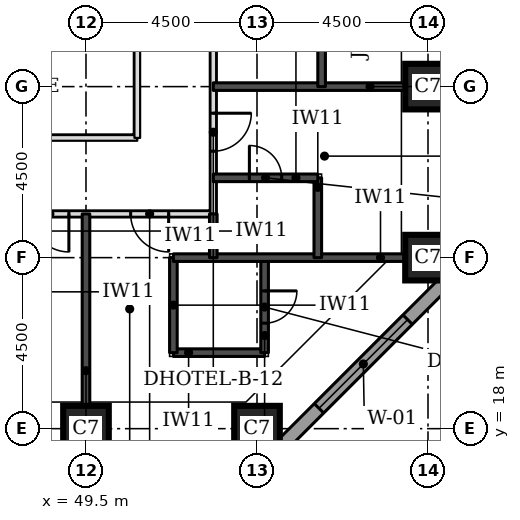
"""IFC4 building model, lengths in metres.
Left out: names, types, materials, properties, quantities, classifications, styles, units other than length and angle.
Written with IfcOpenShell. Run it as: python <this file> out.ifc"""

import sys

from ifc_helpers import new_model, si_unit, direction, frame, frame_2d, origin, origin_2d, place, context, subcontext, project, spatial, rectangle, extrude, element, fill, save


model = new_model("IFC4")
c1 = context("Model", 3, precision=1e-05, world=origin(), true_north=direction((0.0, 1.0)))
c2 = subcontext(c1, "Body", "Model", "MODEL_VIEW")
j1 = project(units=[si_unit("LENGTHUNIT", "METRE"), si_unit("PLANEANGLEUNIT", "RADIAN")], contexts=[c1])
p1 = place(None, origin())
s1 = spatial("IfcSite", under=j1, at=p1, CompositionType="ELEMENT")
p2 = place(p1, origin())
s2 = spatial("IfcBuilding", under=s1, at=p2, CompositionType="ELEMENT")
p3 = place(p2, frame((0.0, 0.0, 29.7)))
s3 = spatial("IfcBuildingStorey", under=s2, at=p3, CompositionType="ELEMENT", Elevation=29.7)
for number, where, z_axis, x_axis in (
    (1, (49.5, 18.0, 0.0), (0.0, 0.0, 1.0), (1.0, 0.0, 0.0)),
    (2, (54.0, 18.0, 0.0), (0.0, 0.0, 1.0), (1.0, 0.0, 0.0)),
    (3, (58.5, 22.5, 0.0), (0.0, 0.0, 1.0), (1.0, 0.0, 0.0)),
    (4, (58.5, 27.0, 0.0), (0.0, 0.0, 1.0), (1.0, 0.0, 0.0)),
):
    element("IfcColumn", number, at=place(p3, frame(where, z_axis=z_axis, x_axis=x_axis)), inside=s3, PredefinedType="COLUMN", context=c2, shape_type="SweptSolid", body=[
        extrude(rectangle(XDim=1.2, YDim=1.2, at=origin_2d()), origin(), (0.0, 0.0, 1.0), 3.3),
    ])
p4 = place(p3, frame((54.27, 17.174, 0.0), z_axis=(0.0, 0.0, 1.0), x_axis=(0.707106781187, 0.707106781187, 0.0)))
e5 = element("IfcWall", 5, at=p4, inside=s3, PredefinedType="STANDARD", context=c2, shape_type="SweptSolid", body=[
    extrude(rectangle(XDim=7.151, YDim=0.35, at=frame_2d((3.576, 0.0))), origin(), (0.0, 0.0, 1.0), 3.055),
])
p5 = place(p4, frame((1.926, 0.0, 0.8)))
e6 = element("IfcOpeningElement", 6, at=p5, cuts=e5, PredefinedType="OPENING", context=c2, shape_type="SweptSolid", body=[
    extrude(rectangle(XDim=3.3, YDim=1.5, at=frame_2d((1.65, 0.75))), frame((0.0, 0.185, 0.0), z_axis=(0.0, -1.0, 0.0), x_axis=(1.0, 0.0, 0.0)), (0.0, 0.0, 1.0), 0.37),
])
p6 = place(p3, frame((20.65, 23.65, 0.0), z_axis=(0.0, 0.0, 1.0), x_axis=(1.0, 0.0, 0.0)))
e7 = element("IfcWall", 7, at=p6, inside=s3, PredefinedType="PARTITIONING", context=c2, shape_type="SweptSolid", body=[
    extrude(rectangle(XDim=32.2, YDim=0.15, at=frame_2d((16.1, 0.0))), origin(), (0.0, 0.0, 1.0), 3.08),
])
p7 = place(p6, frame((2.55, 0.0, 0.0)))
e8 = element("IfcOpeningElement", 8, at=p7, cuts=e7, PredefinedType="OPENING", context=c2, shape_type="SweptSolid", body=[
    extrude(rectangle(XDim=1.0, YDim=2.1, at=frame_2d((0.5, 1.05))), frame((0.0, 0.085, 0.0), z_axis=(0.0, -1.0, 0.0), x_axis=(1.0, 0.0, 0.0)), (0.0, 0.0, 1.0), 0.17),
])
p8 = place(p6, frame((9.4, 0.0, 0.0)))
e9 = element("IfcOpeningElement", 9, at=p8, cuts=e7, PredefinedType="OPENING", context=c2, shape_type="SweptSolid", body=[
    extrude(rectangle(XDim=1.0, YDim=2.1, at=frame_2d((0.5, 1.05))), frame((0.0, 0.085, 0.0), z_axis=(0.0, -1.0, 0.0), x_axis=(1.0, 0.0, 0.0)), (0.0, 0.0, 1.0), 0.17),
])
p9 = place(p6, frame((11.55, 0.0, 0.0)))
e10 = element("IfcOpeningElement", 10, at=p9, cuts=e7, PredefinedType="OPENING", context=c2, shape_type="SweptSolid", body=[
    extrude(rectangle(XDim=1.0, YDim=2.1, at=frame_2d((0.5, 1.05))), frame((0.0, 0.085, 0.0), z_axis=(0.0, -1.0, 0.0), x_axis=(1.0, 0.0, 0.0)), (0.0, 0.0, 1.0), 0.17),
])
p10 = place(p6, frame((18.4, 0.0, 0.0)))
e11 = element("IfcOpeningElement", 11, at=p10, cuts=e7, PredefinedType="OPENING", context=c2, shape_type="SweptSolid", body=[
    extrude(rectangle(XDim=1.0, YDim=2.1, at=frame_2d((0.5, 1.05))), frame((0.0, 0.085, 0.0), z_axis=(0.0, -1.0, 0.0), x_axis=(1.0, 0.0, 0.0)), (0.0, 0.0, 1.0), 0.17),
])
p11 = place(p6, frame((20.55, 0.0, 0.0)))
e12 = element("IfcOpeningElement", 12, at=p11, cuts=e7, PredefinedType="OPENING", context=c2, shape_type="SweptSolid", body=[
    extrude(rectangle(XDim=1.0, YDim=2.1, at=frame_2d((0.5, 1.05))), frame((0.0, 0.085, 0.0), z_axis=(0.0, -1.0, 0.0), x_axis=(1.0, 0.0, 0.0)), (0.0, 0.0, 1.0), 0.17),
])
p12 = place(p6, frame((27.4, 0.0, 0.0)))
e13 = element("IfcOpeningElement", 13, at=p12, cuts=e7, PredefinedType="OPENING", context=c2, shape_type="SweptSolid", body=[
    extrude(rectangle(XDim=1.0, YDim=2.1, at=frame_2d((0.5, 1.05))), frame((0.0, 0.085, 0.0), z_axis=(0.0, -1.0, 0.0), x_axis=(1.0, 0.0, 0.0)), (0.0, 0.0, 1.0), 0.17),
])
p13 = place(p6, frame((0.425, 0.0, 0.0)))
e14 = element("IfcOpeningElement", 14, at=p13, cuts=e7, PredefinedType="OPENING", context=c2, shape_type="SweptSolid", body=[
    extrude(rectangle(XDim=1.0, YDim=2.1, at=frame_2d((0.5, 1.05))), frame((0.0, 0.085, 0.0), z_axis=(0.0, -1.0, 0.0), x_axis=(1.0, 0.0, 0.0)), (0.0, 0.0, 1.0), 0.17),
])
p14 = place(p6, frame((30.025, 0.0, 0.0)))
e15 = element("IfcOpeningElement", 15, at=p14, cuts=e7, PredefinedType="OPENING", context=c2, shape_type="SweptSolid", body=[
    extrude(rectangle(XDim=1.0, YDim=2.1, at=frame_2d((0.5, 1.05))), frame((0.0, 0.085, 0.0), z_axis=(0.0, -1.0, 0.0), x_axis=(1.0, 0.0, 0.0)), (0.0, 0.0, 1.0), 0.17),
])
p15 = place(p3, frame((52.85, 23.65, 0.0), z_axis=(0.0, 0.0, 1.0), x_axis=(0.0, 1.0, 0.0)))
e16 = element("IfcWall", 16, at=p15, inside=s3, PredefinedType="PARTITIONING", context=c2, shape_type="SweptSolid", body=[
    extrude(rectangle(XDim=23.85, YDim=0.15, at=frame_2d((11.925, 0.0))), origin(), (0.0, 0.0, 1.0), 3.08),
])
p16 = place(p15, frame((1.65, 0.0, 0.0)))
e17 = element("IfcOpeningElement", 17, at=p16, cuts=e16, PredefinedType="OPENING", context=c2, shape_type="SweptSolid", body=[
    extrude(rectangle(XDim=1.0, YDim=2.1, at=frame_2d((0.5, 1.05))), frame((0.0, 0.085, 0.0), z_axis=(0.0, -1.0, 0.0), x_axis=(1.0, 0.0, 0.0)), (0.0, 0.0, 1.0), 0.17),
])
p17 = place(p15, frame((8.95, 0.0, 0.0)))
e18 = element("IfcOpeningElement", 18, at=p17, cuts=e16, PredefinedType="OPENING", context=c2, shape_type="SweptSolid", body=[
    extrude(rectangle(XDim=1.0, YDim=2.1, at=frame_2d((0.5, 1.05))), frame((0.0, 0.085, 0.0), z_axis=(0.0, -1.0, 0.0), x_axis=(1.0, 0.0, 0.0)), (0.0, 0.0, 1.0), 0.17),
])
p18 = place(p15, frame((13.05, 0.0, 0.0)))
e19 = element("IfcOpeningElement", 19, at=p18, cuts=e16, PredefinedType="OPENING", context=c2, shape_type="SweptSolid", body=[
    extrude(rectangle(XDim=1.0, YDim=2.1, at=frame_2d((0.5, 1.05))), frame((0.0, 0.085, 0.0), z_axis=(0.0, -1.0, 0.0), x_axis=(1.0, 0.0, 0.0)), (0.0, 0.0, 1.0), 0.17),
])
p19 = place(p15, frame((19.9, 0.0, 0.0)))
e20 = element("IfcOpeningElement", 20, at=p19, cuts=e16, PredefinedType="OPENING", context=c2, shape_type="SweptSolid", body=[
    extrude(rectangle(XDim=0.9, YDim=2.1, at=frame_2d((0.45, 1.05))), frame((0.0, 0.085, 0.0), z_axis=(0.0, -1.0, 0.0), x_axis=(1.0, 0.0, 0.0)), (0.0, 0.0, 1.0), 0.17),
])
p20 = place(p3, frame((40.5, 25.65, 0.0), z_axis=(0.0, 0.0, 1.0), x_axis=(1.0, 0.0, 0.0)))
e21 = element("IfcWall", 21, at=p20, inside=s3, PredefinedType="PARTITIONING", context=c2, shape_type="SweptSolid", body=[
    extrude(rectangle(XDim=10.35, YDim=0.15, at=frame_2d((5.175, 0.0))), origin(), (0.0, 0.0, 1.0), 3.08),
])
p21 = place(p3, frame((50.85, 25.65, 0.0), z_axis=(0.0, 0.0, 1.0), x_axis=(0.0, 1.0, 0.0)))
e22 = element("IfcWall", 22, at=p21, inside=s3, PredefinedType="PARTITIONING", context=c2, shape_type="SweptSolid", body=[
    extrude(rectangle(XDim=3.85, YDim=0.15, at=frame_2d((1.925, 0.0))), origin(), (0.0, 0.0, 1.0), 3.08),
])
p22 = place(p3, frame((49.5, 18.6, 0.0), z_axis=(0.0, 0.0, 1.0), x_axis=(0.0, 1.0, 0.0)))
e23 = element("IfcWall", 23, at=p22, inside=s3, PredefinedType="SOLIDWALL", context=c2, shape_type="SweptSolid", body=[
    extrude(rectangle(XDim=5.05, YDim=0.2, at=frame_2d((2.525, 0.0))), origin(), (0.0, 0.0, 1.0), 3.08),
])
p23 = place(p3, frame((51.8, 20.0, 0.0), z_axis=(0.0, 0.0, 1.0), x_axis=(1.0, 0.0, 0.0)))
e24 = element("IfcWall", 24, at=p23, inside=s3, PredefinedType="SOLIDWALL", context=c2, shape_type="SweptSolid", body=[
    extrude(rectangle(XDim=2.4, YDim=0.2, at=frame_2d((1.2, 0.0))), origin(), (0.0, 0.0, 1.0), 3.08),
])
p24 = place(p3, frame((51.8, 20.0, 0.0), z_axis=(0.0, 0.0, 1.0), x_axis=(0.0, 1.0, 0.0)))
e25 = element("IfcWall", 25, at=p24, inside=s3, PredefinedType="SOLIDWALL", context=c2, shape_type="SweptSolid", body=[
    extrude(rectangle(XDim=2.5, YDim=0.2, at=frame_2d((1.25, 0.0))), origin(), (0.0, 0.0, 1.0), 3.08),
])
p25 = place(p3, frame((54.2, 20.0, 0.0), z_axis=(0.0, 0.0, 1.0), x_axis=(0.0, 1.0, 0.0)))
e26 = element("IfcWall", 26, at=p25, inside=s3, PredefinedType="SOLIDWALL", context=c2, shape_type="SweptSolid", body=[
    extrude(rectangle(XDim=2.5, YDim=0.2, at=frame_2d((1.25, 0.0))), origin(), (0.0, 0.0, 1.0), 3.08),
])
p26 = place(p25, frame((0.775, 0.0, 0.0)))
e27 = element("IfcOpeningElement", 27, at=p26, cuts=e26, PredefinedType="OPENING", context=c2, shape_type="SweptSolid", body=[
    extrude(rectangle(XDim=0.85, YDim=2.1, at=frame_2d((0.425, 1.05))), frame((0.0, 0.11, 0.0), z_axis=(0.0, -1.0, 0.0), x_axis=(1.0, 0.0, 0.0)), (0.0, 0.0, 1.0), 0.22),
])
p27 = place(p3, frame((51.8, 22.5, 0.0), z_axis=(0.0, 0.0, 1.0), x_axis=(1.0, 0.0, 0.0)))
e28 = element("IfcWall", 28, at=p27, inside=s3, PredefinedType="SOLIDWALL", context=c2, shape_type="SweptSolid", body=[
    extrude(rectangle(XDim=6.1, YDim=0.2, at=frame_2d((3.05, 0.0))), origin(), (0.0, 0.0, 1.0), 3.08),
])
p28 = place(p3, frame((52.85, 22.5, 0.0), z_axis=(0.0, 0.0, 1.0), x_axis=(0.0, 1.0, 0.0)))
e29 = element("IfcWall", 29, at=p28, inside=s3, PredefinedType="SOLIDWALL", context=c2, shape_type="SweptSolid", body=[
    extrude(rectangle(XDim=1.15, YDim=0.2, at=frame_2d((0.575, 0.0))), origin(), (0.0, 0.0, 1.0), 3.08),
])
p29 = place(p3, frame((55.6, 22.5, 0.0), z_axis=(0.0, 0.0, 1.0), x_axis=(0.0, 1.0, 0.0)))
e30 = element("IfcWall", 30, at=p29, inside=s3, PredefinedType="SOLIDWALL", context=c2, shape_type="SweptSolid", body=[
    extrude(rectangle(XDim=2.1, YDim=0.2, at=frame_2d((1.05, 0.0))), origin(), (0.0, 0.0, 1.0), 3.08),
])
p30 = place(p3, frame((52.85, 24.6, 0.0), z_axis=(0.0, 0.0, 1.0), x_axis=(1.0, 0.0, 0.0)))
e31 = element("IfcWall", 31, at=p30, inside=s3, PredefinedType="SOLIDWALL", context=c2, shape_type="SweptSolid", body=[
    extrude(rectangle(XDim=2.75, YDim=0.2, at=frame_2d((1.375, 0.0))), origin(), (0.0, 0.0, 1.0), 3.08),
])
p31 = place(p30, frame((0.95, 0.0, 0.0)))
e32 = element("IfcOpeningElement", 32, at=p31, cuts=e31, PredefinedType="OPENING", context=c2, shape_type="SweptSolid", body=[
    extrude(rectangle(XDim=0.85, YDim=2.1, at=frame_2d((0.425, 1.05))), frame((0.0, 0.11, 0.0), z_axis=(0.0, -1.0, 0.0), x_axis=(1.0, 0.0, 0.0)), (0.0, 0.0, 1.0), 0.22),
])
p32 = place(p3, frame((52.85, 27.0, 0.0), z_axis=(0.0, 0.0, 1.0), x_axis=(1.0, 0.0, 0.0)))
e33 = element("IfcWall", 33, at=p32, inside=s3, PredefinedType="SOLIDWALL", context=c2, shape_type="SweptSolid", body=[
    extrude(rectangle(XDim=5.05, YDim=0.2, at=frame_2d((2.525, 0.0))), origin(), (0.0, 0.0, 1.0), 3.08),
])
p33 = place(p3, frame((55.7, 27.0, 0.0), z_axis=(0.0, 0.0, 1.0), x_axis=(0.0, 1.0, 0.0)))
e34 = element("IfcWall", 34, at=p33, inside=s3, PredefinedType="SOLIDWALL", context=c2, shape_type="SweptSolid", body=[
    extrude(rectangle(XDim=3.2, YDim=0.2, at=frame_2d((1.6, 0.0))), origin(), (0.0, 0.0, 1.0), 3.08),
])
p34 = place(p5, origin())
e35 = element("IfcWindow", 35, at=p34, inside=s3, PartitioningType="SINGLE_PANEL", PredefinedType="WINDOW", context=c2, shape_type="SweptSolid", body=[
    extrude(rectangle(XDim=3.3, YDim=1.5, at=frame_2d((1.65, 0.75))), frame((0.0, 0.085, 0.0), z_axis=(0.0, -1.0, 0.0), x_axis=(1.0, 0.0, 0.0)), (0.0, 0.0, 1.0), 0.06),
])
fill(e6, e35)
p35 = place(p12, frame((1.0, 0.0, 0.0), z_axis=(0.0, 0.0, 1.0), x_axis=(-1.0, 0.0, 0.0)))
e36 = element("IfcDoor", 36, at=p35, inside=s3, OperationType="SINGLE_SWING_LEFT", PredefinedType="DOOR", context=c2, shape_type="SweptSolid", body=[
    extrude(rectangle(XDim=1.0, YDim=2.1, at=frame_2d((0.5, 1.05))), frame((0.0, 0.025, 0.0), z_axis=(0.0, -1.0, 0.0), x_axis=(1.0, 0.0, 0.0)), (0.0, 0.0, 1.0), 0.05),
])
fill(e13, e36)
p36 = place(p16, frame((1.0, 0.0, 0.0), z_axis=(0.0, 0.0, 1.0), x_axis=(-1.0, 0.0, 0.0)))
e37 = element("IfcDoor", 37, at=p36, inside=s3, OperationType="SINGLE_SWING_LEFT", PredefinedType="DOOR", context=c2, shape_type="SweptSolid", body=[
    extrude(rectangle(XDim=1.0, YDim=2.1, at=frame_2d((0.5, 1.05))), frame((0.0, 0.025, 0.0), z_axis=(0.0, -1.0, 0.0), x_axis=(1.0, 0.0, 0.0)), (0.0, 0.0, 1.0), 0.05),
])
fill(e17, e37)
p37 = place(p31, origin())
e38 = element("IfcDoor", 38, at=p37, inside=s3, OperationType="SINGLE_SWING_LEFT", PredefinedType="DOOR", context=c2, shape_type="SweptSolid", body=[
    extrude(rectangle(XDim=0.85, YDim=2.1, at=frame_2d((0.425, 1.05))), frame((0.0, 0.025, 0.0), z_axis=(0.0, -1.0, 0.0), x_axis=(1.0, 0.0, 0.0)), (0.0, 0.0, 1.0), 0.05),
])
fill(e32, e38)
p38 = place(p14, frame((1.0, 0.0, 0.0), z_axis=(0.0, 0.0, 1.0), x_axis=(-1.0, 0.0, 0.0)))
e39 = element("IfcDoor", 39, at=p38, inside=s3, OperationType="SINGLE_SWING_LEFT", PredefinedType="DOOR", context=c2, shape_type="SweptSolid", body=[
    extrude(rectangle(XDim=1.0, YDim=2.1, at=frame_2d((0.5, 1.05))), frame((0.0, 0.025, 0.0), z_axis=(0.0, -1.0, 0.0), x_axis=(1.0, 0.0, 0.0)), (0.0, 0.0, 1.0), 0.05),
])
fill(e15, e39)
p39 = place(p26, frame((0.85, 0.0, 0.0), z_axis=(0.0, 0.0, 1.0), x_axis=(-1.0, 0.0, 0.0)))
e40 = element("IfcDoor", 40, at=p39, inside=s3, OperationType="SINGLE_SWING_LEFT", PredefinedType="DOOR", context=c2, shape_type="SweptSolid", body=[
    extrude(rectangle(XDim=0.85, YDim=2.1, at=frame_2d((0.425, 1.05))), frame((0.0, 0.025, 0.0), z_axis=(0.0, -1.0, 0.0), x_axis=(1.0, 0.0, 0.0)), (0.0, 0.0, 1.0), 0.05),
])
fill(e27, e40)
save(model, sys.argv[1])
